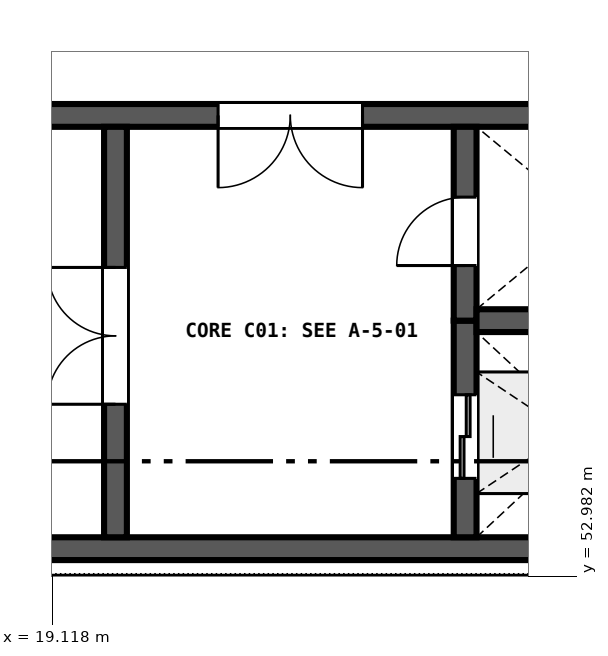
"""IFC4 building model, lengths in metres.
Left out: names, types, materials, properties, quantities, classifications, styles, units other than length and angle.
Written with IfcOpenShell. Run it as: python <this file> out.ifc"""

import sys

from ifc_helpers import new_model, si_unit, direction, frame, frame_2d, origin, place, context, subcontext, project, spatial, rectangle, extrude, element, fill, save


model = new_model("IFC4")
c1 = context("Model", 3, precision=1e-05, world=origin(), true_north=direction((0.0, 1.0)))
c2 = subcontext(c1, "Body", "Model", "MODEL_VIEW")
j1 = project(units=[si_unit("LENGTHUNIT", "METRE"), si_unit("PLANEANGLEUNIT", "RADIAN")], contexts=[c1])
p1 = place(None, origin())
s1 = spatial("IfcSite", under=j1, at=p1, CompositionType="ELEMENT")
p2 = place(p1, origin())
s2 = spatial("IfcBuilding", under=s1, at=p2, CompositionType="ELEMENT")
p3 = place(p2, frame((0.0, 0.0, 19.2)))
s3 = spatial("IfcBuildingStorey", under=s2, at=p3, CompositionType="ELEMENT", Elevation=19.2)
p4 = place(p3, frame((9.9, 53.35, 0.0), z_axis=(0.0, 0.0, 1.0), x_axis=(1.0, 0.0, 0.0)))
e1 = element("IfcWall", 1, at=p4, inside=s3, PredefinedType="SHEAR", context=c2, shape_type="SweptSolid", body=[
    extrude(rectangle(XDim=18.0, YDim=0.3, at=frame_2d((9.0, 0.0))), origin(), (0.0, 0.0, 1.0), 4.55),
])
p5 = place(p3, frame((27.9, 59.05, 0.0), z_axis=(0.0, 0.0, 1.0), x_axis=(-1.0, 0.0, 0.0)))
e2 = element("IfcWall", 2, at=p5, inside=s3, PredefinedType="SHEAR", context=c2, shape_type="SweptSolid", body=[
    extrude(rectangle(XDim=18.0, YDim=0.3, at=frame_2d((9.0, 0.0))), origin(), (0.0, 0.0, 1.0), 4.55),
])
p6 = place(p5, frame((4.7, 0.0, 0.0)))
e3 = element("IfcOpeningElement", 3, at=p6, cuts=e2, PredefinedType="OPENING", context=c2, shape_type="SweptSolid", body=[
    extrude(rectangle(XDim=1.9, YDim=2.25, at=frame_2d((0.95, 1.125))), frame((0.0, 0.16, 0.0), z_axis=(0.0, -1.0, 0.0), x_axis=(1.0, 0.0, 0.0)), (0.0, 0.0, 1.0), 0.32),
])
p7 = place(p3, frame((19.95, 53.5, 0.0), z_axis=(0.0, 0.0, 1.0), x_axis=(0.0, 1.0, 0.0)))
e4 = element("IfcWall", 4, at=p7, inside=s3, PredefinedType="SHEAR", context=c2, shape_type="SweptSolid", body=[
    extrude(rectangle(XDim=5.4, YDim=0.3, at=frame_2d((2.7, 0.0))), origin(), (0.0, 0.0, 1.0), 4.55),
])
p8 = place(p7, frame((1.75, 0.0, 0.0)))
e5 = element("IfcOpeningElement", 5, at=p8, cuts=e4, PredefinedType="OPENING", context=c2, shape_type="SweptSolid", body=[
    extrude(rectangle(XDim=1.8, YDim=2.25, at=frame_2d((0.9, 1.125))), frame((0.0, 0.16, 0.0), z_axis=(0.0, -1.0, 0.0), x_axis=(1.0, 0.0, 0.0)), (0.0, 0.0, 1.0), 0.32),
])
p9 = place(p3, frame((24.55, 53.5, 0.0), z_axis=(0.0, 0.0, 1.0), x_axis=(0.0, 1.0, 0.0)))
e6 = element("IfcWall", 6, at=p9, inside=s3, PredefinedType="SHEAR", context=c2, shape_type="SweptSolid", body=[
    extrude(rectangle(XDim=2.85, YDim=0.3, at=frame_2d((1.425, 0.0))), origin(), (0.0, 0.0, 1.0), 4.55),
])
p10 = place(p9, frame((0.775, 0.0, 0.0)))
e7 = element("IfcOpeningElement", 7, at=p10, cuts=e6, PredefinedType="OPENING", context=c2, shape_type="SweptSolid", body=[
    extrude(rectangle(XDim=1.1, YDim=2.1, at=frame_2d((0.55, 1.05))), frame((0.0, 0.16, 0.0), z_axis=(0.0, -1.0, 0.0), x_axis=(1.0, 0.0, 0.0)), (0.0, 0.0, 1.0), 0.32),
])
p11 = place(p3, frame((24.55, 56.35, 0.0), z_axis=(0.0, 0.0, 1.0), x_axis=(0.0, 1.0, 0.0)))
e8 = element("IfcWall", 8, at=p11, inside=s3, PredefinedType="SHEAR", context=c2, shape_type="SweptSolid", body=[
    extrude(rectangle(XDim=2.55, YDim=0.3, at=frame_2d((1.275, 0.0))), origin(), (0.0, 0.0, 1.0), 4.55),
])
p12 = place(p11, frame((0.725, 0.0, 0.0)))
e9 = element("IfcOpeningElement", 9, at=p12, cuts=e8, PredefinedType="OPENING", context=c2, shape_type="SweptSolid", body=[
    extrude(rectangle(XDim=0.9, YDim=2.1, at=frame_2d((0.45, 1.05))), frame((0.0, 0.16, 0.0), z_axis=(0.0, -1.0, 0.0), x_axis=(1.0, 0.0, 0.0)), (0.0, 0.0, 1.0), 0.32),
])
p13 = place(p3, frame((24.7, 56.35, 0.0), z_axis=(0.0, 0.0, 1.0), x_axis=(1.0, 0.0, 0.0)))
e10 = element("IfcWall", 10, at=p13, inside=s3, PredefinedType="SHEAR", context=c2, shape_type="SweptSolid", body=[
    extrude(rectangle(XDim=2.9, YDim=0.3, at=frame_2d((1.45, 0.0))), origin(), (0.0, 0.0, 1.0), 4.55),
])
p14 = place(p8, origin())
e11 = element("IfcDoor", 11, at=p14, inside=s3, OperationType="DOUBLE_DOOR_SINGLE_SWING", PredefinedType="DOOR", context=c2, shape_type="SweptSolid", body=[
    extrude(rectangle(XDim=1.8, YDim=2.25, at=frame_2d((0.9, 1.125))), frame((0.0, 0.025, 0.0), z_axis=(0.0, -1.0, 0.0), x_axis=(1.0, 0.0, 0.0)), (0.0, 0.0, 1.0), 0.05),
])
fill(e5, e11)
p15 = place(p12, origin())
e12 = element("IfcDoor", 12, at=p15, inside=s3, OperationType="SINGLE_SWING_LEFT", PredefinedType="DOOR", context=c2, shape_type="SweptSolid", body=[
    extrude(rectangle(XDim=0.9, YDim=2.1, at=frame_2d((0.45, 1.05))), frame((0.0, 0.025, 0.0), z_axis=(0.0, -1.0, 0.0), x_axis=(1.0, 0.0, 0.0)), (0.0, 0.0, 1.0), 0.05),
])
fill(e9, e12)
p16 = place(p10, origin())
e13 = element("IfcDoor", 13, at=p16, inside=s3, OperationType="DOUBLE_DOOR_SLIDING", PredefinedType="DOOR", context=c2, shape_type="SweptSolid", body=[
    extrude(rectangle(XDim=1.1, YDim=2.1, at=frame_2d((0.55, 1.05))), frame((0.0, 0.025, 0.0), z_axis=(0.0, -1.0, 0.0), x_axis=(1.0, 0.0, 0.0)), (0.0, 0.0, 1.0), 0.05),
])
fill(e7, e13)
p17 = place(p6, origin())
e14 = element("IfcDoor", 14, at=p17, inside=s3, OperationType="DOUBLE_DOOR_SINGLE_SWING", PredefinedType="DOOR", context=c2, shape_type="SweptSolid", body=[
    extrude(rectangle(XDim=1.9, YDim=2.25, at=frame_2d((0.95, 1.125))), frame((0.0, 0.025, 0.0), z_axis=(0.0, -1.0, 0.0), x_axis=(1.0, 0.0, 0.0)), (0.0, 0.0, 1.0), 0.05),
])
fill(e3, e14)
save(model, sys.argv[1])
